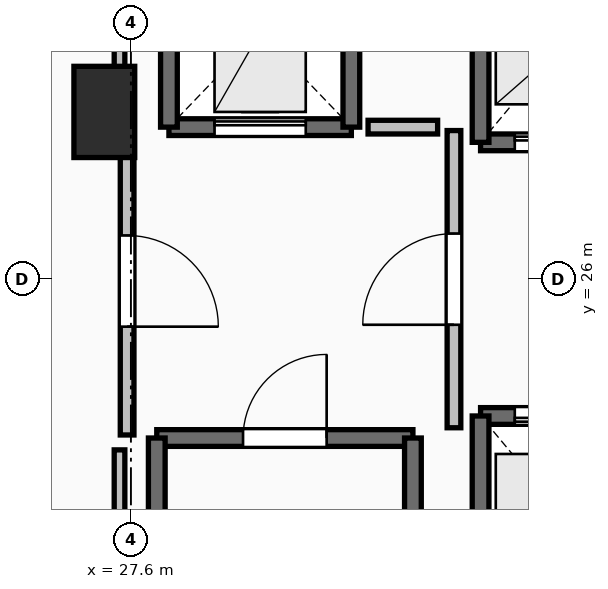
"""IFC4 building model, lengths in metres.
Left out: names, types, materials, properties, quantities, classifications, styles, units other than length and angle.
Written with IfcOpenShell. Run it as: python <this file> out.ifc"""

import sys

from ifc_helpers import new_model, si_unit, direction, frame, frame_2d, origin, origin_2d, place, context, subcontext, project, spatial, rectangle, extrude, element, fill, save


model = new_model("IFC4")
c1 = context("Model", 3, precision=1e-05, world=origin(), true_north=direction((0.0, 1.0)))
c2 = subcontext(c1, "Body", "Model", "MODEL_VIEW")
j1 = project(units=[si_unit("LENGTHUNIT", "METRE"), si_unit("PLANEANGLEUNIT", "RADIAN")], contexts=[c1])
p1 = place(None, origin())
s1 = spatial("IfcSite", under=j1, at=p1, CompositionType="ELEMENT")
p2 = place(p1, origin())
s2 = spatial("IfcBuilding", under=s1, at=p2, CompositionType="ELEMENT")
p3 = place(p2, origin())
s3 = spatial("IfcBuildingStorey", under=s2, at=p3, CompositionType="ELEMENT", Elevation=0.0)
p4 = place(p3, frame((27.25, 28.2, 0.0), z_axis=(0.0, 0.0, 1.0), x_axis=(1.0, 0.0, 0.0)))
e1 = element("IfcColumn", 1, at=p4, inside=s3, PredefinedType="PILASTER", context=c2, shape_type="SweptSolid", body=[
    extrude(rectangle(XDim=0.8, YDim=1.2, at=origin_2d()), origin(), (0.0, 0.0, 1.0), 4.8),
])
p5 = place(p3, frame((27.94, 23.91, 0.0), z_axis=(0.0, 0.0, 1.0), x_axis=(1.0, 0.0, 0.0)))
e2 = element("IfcWall", 2, at=p5, inside=s3, PredefinedType="SOLIDWALL", context=c2, shape_type="SweptSolid", body=[
    extrude(rectangle(XDim=3.37, YDim=0.22, at=frame_2d((1.685, 0.0))), origin(), (0.0, 0.0, 1.0), 4.48),
])
p6 = place(p5, frame((1.135, 0.0, 0.0)))
e3 = element("IfcOpeningElement", 3, at=p6, cuts=e2, PredefinedType="OPENING", context=c2, shape_type="SweptSolid", body=[
    extrude(rectangle(XDim=1.1, YDim=2.15, at=frame_2d((0.55, 1.075))), frame((0.0, 0.125, 0.0), z_axis=(0.0, -1.0, 0.0), x_axis=(1.0, 0.0, 0.0)), (0.0, 0.0, 1.0), 0.25),
])
for number, where, z_axis, x_axis in (
    (4, (31.31, 23.91, 0.0), (0.0, 0.0, 1.0), (0.0, -1.0, 0.0)),
    (5, (27.94, 16.49, 0.0), (0.0, 0.0, 1.0), (0.0, 1.0, 0.0)),
):
    element("IfcWall", number, at=place(p3, frame(where, z_axis=z_axis, x_axis=x_axis)), inside=s3, PredefinedType="SOLIDWALL", context=c2, shape_type="SweptSolid", body=[
        extrude(rectangle(XDim=7.42, YDim=0.22, at=frame_2d((3.71, 0.0))), origin(), (0.0, 0.0, 1.0), 4.48),
    ])
p7 = place(p3, frame((32.2, 27.8, 0.0), z_axis=(0.0, 0.0, 1.0), x_axis=(1.0, 0.0, 0.0)))
e6 = element("IfcWall", 6, at=p7, inside=s3, PredefinedType="SOLIDWALL", context=c2, shape_type="SweptSolid", body=[
    extrude(rectangle(XDim=2.0, YDim=0.22, at=frame_2d((1.0, 0.0))), origin(), (0.0, 0.0, 1.0), 4.48),
])
p8 = place(p7, frame((0.45, 0.0, 0.0)))
e7 = element("IfcOpeningElement", 7, at=p8, cuts=e6, PredefinedType="OPENING", context=c2, shape_type="SweptSolid", body=[
    extrude(rectangle(XDim=1.1, YDim=2.2, at=frame_2d((0.55, 1.1))), frame((0.0, 0.125, 0.0), z_axis=(0.0, -1.0, 0.0), x_axis=(1.0, 0.0, 0.0)), (0.0, 0.0, 1.0), 0.25),
])
p9 = place(p3, frame((32.2, 30.2, 0.0), z_axis=(0.0, 0.0, 1.0), x_axis=(0.0, -1.0, 0.0)))
e8 = element("IfcWall", 8, at=p9, inside=s3, PredefinedType="SOLIDWALL", context=c2, shape_type="SweptSolid", body=[
    extrude(rectangle(XDim=2.4, YDim=0.22, at=frame_2d((1.2, 0.0))), origin(), (0.0, 0.0, 1.0), 4.48),
])
p10 = place(p3, frame((34.2, 24.2, 0.0), z_axis=(0.0, 0.0, 1.0), x_axis=(-1.0, 0.0, 0.0)))
e9 = element("IfcWall", 9, at=p10, inside=s3, PredefinedType="SOLIDWALL", context=c2, shape_type="SweptSolid", body=[
    extrude(rectangle(XDim=2.0, YDim=0.22, at=frame_2d((1.0, 0.0))), origin(), (0.0, 0.0, 1.0), 4.48),
])
p11 = place(p10, frame((0.45, 0.0, 0.0)))
e10 = element("IfcOpeningElement", 10, at=p11, cuts=e9, PredefinedType="OPENING", context=c2, shape_type="SweptSolid", body=[
    extrude(rectangle(XDim=1.1, YDim=2.2, at=frame_2d((0.55, 1.1))), frame((0.0, 0.125, 0.0), z_axis=(0.0, -1.0, 0.0), x_axis=(1.0, 0.0, 0.0)), (0.0, 0.0, 1.0), 0.25),
])
p12 = place(p3, frame((32.2, 24.2, 0.0), z_axis=(0.0, 0.0, 1.0), x_axis=(0.0, -1.0, 0.0)))
e11 = element("IfcWall", 11, at=p12, inside=s3, PredefinedType="SOLIDWALL", context=c2, shape_type="SweptSolid", body=[
    extrude(rectangle(XDim=2.4, YDim=0.22, at=frame_2d((1.2, 0.0))), origin(), (0.0, 0.0, 1.0), 4.48),
])
p13 = place(p3, frame((28.1, 28.0, 0.0), z_axis=(0.0, 0.0, 1.0), x_axis=(1.0, 0.0, 0.0)))
e12 = element("IfcWall", 12, at=p13, inside=s3, PredefinedType="SHEAR", context=c2, shape_type="SweptSolid", body=[
    extrude(rectangle(XDim=2.4, YDim=0.22, at=frame_2d((1.2, 0.0))), origin(), (0.0, 0.0, 1.0), 4.48),
])
p14 = place(p13, frame((0.6, 0.0, 0.0)))
e13 = element("IfcOpeningElement", 13, at=p14, cuts=e12, PredefinedType="OPENING", context=c2, shape_type="SweptSolid", body=[
    extrude(rectangle(XDim=1.2, YDim=2.2, at=frame_2d((0.6, 1.1))), frame((0.0, 0.125, 0.0), z_axis=(0.0, -1.0, 0.0), x_axis=(1.0, 0.0, 0.0)), (0.0, 0.0, 1.0), 0.25),
])
for number, where, z_axis, x_axis in (
    (14, (30.5, 28.0, 0.0), (0.0, 0.0, 1.0), (0.0, 1.0, 0.0)),
    (15, (28.1, 30.5, 0.0), (0.0, 0.0, 1.0), (0.0, -1.0, 0.0)),
):
    element("IfcWall", number, at=place(p3, frame(where, z_axis=z_axis, x_axis=x_axis)), inside=s3, PredefinedType="SHEAR", context=c2, shape_type="SweptSolid", body=[
        extrude(rectangle(XDim=2.5, YDim=0.22, at=frame_2d((1.25, 0.0))), origin(), (0.0, 0.0, 1.0), 4.48),
    ])
p15 = place(p3, frame((31.85, 24.045, 0.0), z_axis=(0.0, 0.0, 1.0), x_axis=(0.0, 1.0, 0.0)))
e16 = element("IfcWall", 16, at=p15, inside=s3, PredefinedType="PARTITIONING", context=c2, shape_type="SweptSolid", body=[
    extrude(rectangle(XDim=3.91, YDim=0.18, at=frame_2d((1.955, 0.0))), origin(), (0.0, 0.0, 1.0), 4.48),
])
p16 = place(p15, frame((1.355, 0.0, 0.0)))
e17 = element("IfcOpeningElement", 17, at=p16, cuts=e16, PredefinedType="OPENING", context=c2, shape_type="SweptSolid", body=[
    extrude(rectangle(XDim=1.2, YDim=2.15, at=frame_2d((0.6, 1.075))), frame((0.0, 0.105, 0.0), z_axis=(0.0, -1.0, 0.0), x_axis=(1.0, 0.0, 0.0)), (0.0, 0.0, 1.0), 0.21),
])
p17 = place(p3, frame((27.55, 28.0, 0.0), z_axis=(0.0, 0.0, 1.0), x_axis=(0.0, -1.0, 0.0)))
e18 = element("IfcWall", 18, at=p17, inside=s3, PredefinedType="PARTITIONING", context=c2, shape_type="SweptSolid", body=[
    extrude(rectangle(XDim=4.05, YDim=0.18, at=frame_2d((2.025, 0.0))), origin(), (0.0, 0.0, 1.0), 4.48),
])
p18 = place(p17, frame((1.425, 0.0, 0.0)))
e19 = element("IfcOpeningElement", 19, at=p18, cuts=e18, PredefinedType="OPENING", context=c2, shape_type="SweptSolid", body=[
    extrude(rectangle(XDim=1.2, YDim=2.15, at=frame_2d((0.6, 1.075))), frame((0.0, 0.105, 0.0), z_axis=(0.0, -1.0, 0.0), x_axis=(1.0, 0.0, 0.0)), (0.0, 0.0, 1.0), 0.21),
])
p19 = place(p3, frame((31.635, 28.0, 0.0), z_axis=(0.0, 0.0, 1.0), x_axis=(-1.0, 0.0, 0.0)))
e20 = element("IfcWall", 20, at=p19, inside=s3, PredefinedType="PARTITIONING", context=c2, shape_type="SweptSolid", body=[
    extrude(rectangle(XDim=0.915, YDim=0.18, at=frame_2d((0.458, 0.0))), origin(), (0.0, 0.0, 1.0), 4.48),
])
p20 = place(p3, frame((27.45, 16.24, 0.0), z_axis=(0.0, 0.0, 1.0), x_axis=(0.0, 1.0, 0.0)))
e21 = element("IfcWall", 21, at=p20, inside=s3, PredefinedType="PARTITIONING", context=c2, shape_type="SweptSolid", body=[
    extrude(rectangle(XDim=7.514, YDim=0.14, at=frame_2d((3.757, 0.0))), origin(), (0.0, 0.0, 1.0), 2.406),
])
p21 = place(p3, frame((27.45, 28.196, 0.0), z_axis=(0.0, 0.0, 1.0), x_axis=(0.0, 1.0, 0.0)))
e22 = element("IfcWall", 22, at=p21, inside=s3, PredefinedType="PARTITIONING", context=c2, shape_type="SweptSolid", body=[
    extrude(rectangle(XDim=5.254, YDim=0.14, at=frame_2d((2.627, 0.0))), origin(), (0.0, 0.0, 1.0), 3.672),
])
p22 = place(p6, origin())
e23 = element("IfcDoor", 23, at=p22, inside=s3, OperationType="SINGLE_SWING_RIGHT", PredefinedType="DOOR", context=c2, shape_type="SweptSolid", body=[
    extrude(rectangle(XDim=1.1, YDim=2.15, at=frame_2d((0.55, 1.075))), frame((0.0, 0.025, 0.0), z_axis=(0.0, -1.0, 0.0), x_axis=(1.0, 0.0, 0.0)), (0.0, 0.0, 1.0), 0.05),
])
fill(e3, e23)
p23 = place(p8, origin())
e24 = element("IfcDoor", 24, at=p23, inside=s3, OperationType="SLIDING_TO_LEFT", PredefinedType="DOOR", context=c2, shape_type="SweptSolid", body=[
    extrude(rectangle(XDim=1.1, YDim=2.2, at=frame_2d((0.55, 1.1))), frame((0.0, 0.025, 0.0), z_axis=(0.0, -1.0, 0.0), x_axis=(1.0, 0.0, 0.0)), (0.0, 0.0, 1.0), 0.05),
])
fill(e7, e24)
p24 = place(p11, origin())
e25 = element("IfcDoor", 25, at=p24, inside=s3, OperationType="SLIDING_TO_LEFT", PredefinedType="DOOR", context=c2, shape_type="SweptSolid", body=[
    extrude(rectangle(XDim=1.1, YDim=2.2, at=frame_2d((0.55, 1.1))), frame((0.0, 0.025, 0.0), z_axis=(0.0, -1.0, 0.0), x_axis=(1.0, 0.0, 0.0)), (0.0, 0.0, 1.0), 0.05),
])
fill(e10, e25)
p25 = place(p14, origin())
e26 = element("IfcDoor", 26, at=p25, inside=s3, OperationType="SLIDING_TO_LEFT", PredefinedType="DOOR", context=c2, shape_type="SweptSolid", body=[
    extrude(rectangle(XDim=1.2, YDim=2.2, at=frame_2d((0.6, 1.1))), frame((0.0, 0.025, 0.0), z_axis=(0.0, -1.0, 0.0), x_axis=(1.0, 0.0, 0.0)), (0.0, 0.0, 1.0), 0.05),
])
fill(e13, e26)
p26 = place(p16, origin())
e27 = element("IfcDoor", 27, at=p26, inside=s3, OperationType="SINGLE_SWING_LEFT", PredefinedType="DOOR", context=c2, shape_type="SweptSolid", body=[
    extrude(rectangle(XDim=1.2, YDim=2.15, at=frame_2d((0.6, 1.075))), frame((0.0, 0.025, 0.0), z_axis=(0.0, -1.0, 0.0), x_axis=(1.0, 0.0, 0.0)), (0.0, 0.0, 1.0), 0.05),
])
fill(e17, e27)
p27 = place(p18, origin())
e28 = element("IfcDoor", 28, at=p27, inside=s3, OperationType="SINGLE_SWING_RIGHT", PredefinedType="DOOR", context=c2, shape_type="SweptSolid", body=[
    extrude(rectangle(XDim=1.2, YDim=2.15, at=frame_2d((0.6, 1.075))), frame((0.0, 0.025, 0.0), z_axis=(0.0, -1.0, 0.0), x_axis=(1.0, 0.0, 0.0)), (0.0, 0.0, 1.0), 0.05),
])
fill(e19, e28)
save(model, sys.argv[1])
